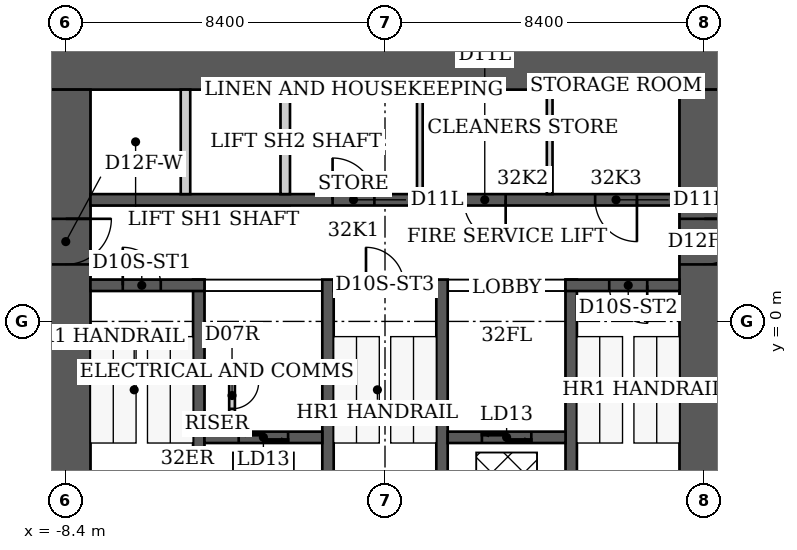
"""IFC4 building model, lengths in metres.
Left out: names, types, materials, properties, quantities, classifications, styles, units other than length and angle.
Written with IfcOpenShell. Run it as: python <this file> out.ifc"""

import sys

from ifc_helpers import new_model, si_unit, direction, frame, frame_2d, origin, place, context, subcontext, project, spatial, rectangle, extrude, element, fill, save


model = new_model("IFC4")
c1 = context("Model", 3, precision=1e-05, world=origin(), true_north=direction((0.0, 1.0)))
c2 = subcontext(c1, "Body", "Model", "MODEL_VIEW")
j1 = project(units=[si_unit("LENGTHUNIT", "METRE"), si_unit("PLANEANGLEUNIT", "RADIAN")], contexts=[c1])
p1 = place(None, origin())
s1 = spatial("IfcSite", under=j1, at=p1, CompositionType="ELEMENT")
p2 = place(p1, origin())
s2 = spatial("IfcBuilding", under=s1, at=p2, CompositionType="ELEMENT")
p3 = place(p2, frame((0.0, 0.0, 131.0)))
s3 = spatial("IfcBuildingStorey", under=s2, at=p3, CompositionType="ELEMENT", Elevation=131.0)
p4 = place(p3, frame((-9.05, 6.75, 0.0), z_axis=(0.0, 0.0, 1.0), x_axis=(1.0, 0.0, 0.0)))
e1 = element("IfcWall", 1, at=p4, inside=s3, PredefinedType="SHEAR", context=c2, shape_type="SweptSolid", body=[
    extrude(rectangle(XDim=18.1, YDim=1.3, at=frame_2d((9.05, 0.0))), origin(), (0.0, 0.0, 1.0), 3.8),
])
p5 = place(p3, frame((-8.4, -9.2, 0.0), z_axis=(0.0, 0.0, 1.0), x_axis=(0.0, 1.0, 0.0)))
e2 = element("IfcWall", 2, at=p5, inside=s3, PredefinedType="SHEAR", context=c2, shape_type="SweptSolid", body=[
    extrude(rectangle(XDim=15.3, YDim=1.3, at=frame_2d((7.65, 0.0))), origin(), (0.0, 0.0, 1.0), 3.8),
])
p6 = place(p5, frame((10.7, 0.0, 0.0)))
e3 = element("IfcOpeningElement", 3, at=p6, cuts=e2, PredefinedType="OPENING", context=c2, shape_type="SweptSolid", body=[
    extrude(rectangle(XDim=1.2, YDim=2.2, at=frame_2d((0.6, 1.1))), frame((0.0, 0.65, 0.0), z_axis=(0.0, -1.0, 0.0), x_axis=(1.0, 0.0, 0.0)), (0.0, 0.0, 1.0), 1.3),
])
p7 = place(p3, frame((8.4, -9.2, 0.0), z_axis=(0.0, 0.0, 1.0), x_axis=(0.0, 1.0, 0.0)))
e4 = element("IfcWall", 4, at=p7, inside=s3, PredefinedType="SHEAR", context=c2, shape_type="SweptSolid", body=[
    extrude(rectangle(XDim=15.3, YDim=1.3, at=frame_2d((7.65, 0.0))), origin(), (0.0, 0.0, 1.0), 3.8),
])
p8 = place(p7, frame((10.7, 0.0, 0.0)))
e5 = element("IfcOpeningElement", 5, at=p8, cuts=e4, PredefinedType="OPENING", context=c2, shape_type="SweptSolid", body=[
    extrude(rectangle(XDim=1.2, YDim=2.2, at=frame_2d((0.6, 1.1))), frame((0.0, 0.65, 0.0), z_axis=(0.0, -1.0, 0.0), x_axis=(1.0, 0.0, 0.0)), (0.0, 0.0, 1.0), 1.3),
])
for number, where, z_axis, x_axis in (
    (6, (-4.9, -6.1, 0.0), (0.0, 0.0, 1.0), (0.0, 1.0, 0.0)),
    (7, (-1.5, -6.1, 0.0), (0.0, 0.0, 1.0), (0.0, 1.0, 0.0)),
    (8, (1.5, -6.1, 0.0), (0.0, 0.0, 1.0), (0.0, 1.0, 0.0)),
    (9, (4.9, -6.1, 0.0), (0.0, 0.0, 1.0), (0.0, 1.0, 0.0)),
):
    element("IfcWall", number, at=place(p3, frame(where, z_axis=z_axis, x_axis=x_axis)), inside=s3, PredefinedType="SHEAR", context=c2, shape_type="SweptSolid", body=[
        extrude(rectangle(XDim=7.2, YDim=0.3, at=frame_2d((3.6, 0.0))), origin(), (0.0, 0.0, 1.0), 3.8),
    ])
p9 = place(p3, frame((-7.75, 0.95, 0.0), z_axis=(0.0, 0.0, 1.0), x_axis=(1.0, 0.0, 0.0)))
e10 = element("IfcWall", 10, at=p9, inside=s3, PredefinedType="SHEAR", context=c2, shape_type="SweptSolid", body=[
    extrude(rectangle(XDim=3.0, YDim=0.3, at=frame_2d((1.5, 0.0))), origin(), (0.0, 0.0, 1.0), 3.8),
])
p10 = place(p9, frame((0.85, 0.0, 0.0)))
e11 = element("IfcOpeningElement", 11, at=p10, cuts=e10, PredefinedType="OPENING", context=c2, shape_type="SweptSolid", body=[
    extrude(rectangle(XDim=1.0, YDim=2.2, at=frame_2d((0.5, 1.1))), frame((0.0, 0.15, 0.0), z_axis=(0.0, -1.0, 0.0), x_axis=(1.0, 0.0, 0.0)), (0.0, 0.0, 1.0), 0.3),
])
p11 = place(p3, frame((-1.35, 0.95, 0.0), z_axis=(0.0, 0.0, 1.0), x_axis=(1.0, 0.0, 0.0)))
e12 = element("IfcWall", 12, at=p11, inside=s3, PredefinedType="SHEAR", context=c2, shape_type="SweptSolid", body=[
    extrude(rectangle(XDim=2.7, YDim=0.3, at=frame_2d((1.35, 0.0))), origin(), (0.0, 0.0, 1.0), 3.8),
])
p12 = place(p11, frame((0.85, 0.0, 0.0)))
e13 = element("IfcOpeningElement", 13, at=p12, cuts=e12, PredefinedType="OPENING", context=c2, shape_type="SweptSolid", body=[
    extrude(rectangle(XDim=1.0, YDim=2.2, at=frame_2d((0.5, 1.1))), frame((0.0, 0.15, 0.0), z_axis=(0.0, -1.0, 0.0), x_axis=(1.0, 0.0, 0.0)), (0.0, 0.0, 1.0), 0.3),
])
p13 = place(p3, frame((4.75, 0.95, 0.0), z_axis=(0.0, 0.0, 1.0), x_axis=(1.0, 0.0, 0.0)))
e14 = element("IfcWall", 14, at=p13, inside=s3, PredefinedType="SHEAR", context=c2, shape_type="SweptSolid", body=[
    extrude(rectangle(XDim=3.0, YDim=0.3, at=frame_2d((1.5, 0.0))), origin(), (0.0, 0.0, 1.0), 3.8),
])
p14 = place(p13, frame((1.15, 0.0, 0.0)))
e15 = element("IfcOpeningElement", 15, at=p14, cuts=e14, PredefinedType="OPENING", context=c2, shape_type="SweptSolid", body=[
    extrude(rectangle(XDim=1.0, YDim=2.2, at=frame_2d((0.5, 1.1))), frame((0.0, 0.15, 0.0), z_axis=(0.0, -1.0, 0.0), x_axis=(1.0, 0.0, 0.0)), (0.0, 0.0, 1.0), 0.3),
])
p15 = place(p3, frame((-4.75, -3.05, 0.0), z_axis=(0.0, 0.0, 1.0), x_axis=(1.0, 0.0, 0.0)))
e16 = element("IfcWall", 16, at=p15, inside=s3, PredefinedType="SHEAR", context=c2, shape_type="SweptSolid", body=[
    extrude(rectangle(XDim=3.1, YDim=0.3, at=frame_2d((1.55, 0.0))), origin(), (0.0, 0.0, 1.0), 3.8),
])
p16 = place(p15, frame((0.9, 0.0, 0.0)))
e17 = element("IfcOpeningElement", 17, at=p16, cuts=e16, PredefinedType="OPENING", context=c2, shape_type="SweptSolid", body=[
    extrude(rectangle(XDim=1.3, YDim=2.1, at=frame_2d((0.65, 1.05))), frame((0.0, 0.15, 0.0), z_axis=(0.0, -1.0, 0.0), x_axis=(1.0, 0.0, 0.0)), (0.0, 0.0, 1.0), 0.3),
])
p17 = place(p3, frame((1.65, -3.05, 0.0), z_axis=(0.0, 0.0, 1.0), x_axis=(1.0, 0.0, 0.0)))
e18 = element("IfcWall", 18, at=p17, inside=s3, PredefinedType="SHEAR", context=c2, shape_type="SweptSolid", body=[
    extrude(rectangle(XDim=3.1, YDim=0.3, at=frame_2d((1.55, 0.0))), origin(), (0.0, 0.0, 1.0), 3.8),
])
p18 = place(p17, frame((0.9, 0.0, 0.0)))
e19 = element("IfcOpeningElement", 19, at=p18, cuts=e18, PredefinedType="OPENING", context=c2, shape_type="SweptSolid", body=[
    extrude(rectangle(XDim=1.3, YDim=2.1, at=frame_2d((0.65, 1.05))), frame((0.0, 0.15, 0.0), z_axis=(0.0, -1.0, 0.0), x_axis=(1.0, 0.0, 0.0)), (0.0, 0.0, 1.0), 0.3),
])
p19 = place(p3, frame((-7.75, 3.2, 0.0), z_axis=(0.0, 0.0, 1.0), x_axis=(1.0, 0.0, 0.0)))
e20 = element("IfcWall", 20, at=p19, inside=s3, PredefinedType="SHEAR", context=c2, shape_type="SweptSolid", body=[
    extrude(rectangle(XDim=15.5, YDim=0.3, at=frame_2d((7.75, 0.0))), origin(), (0.0, 0.0, 1.0), 3.8),
])
p20 = place(p19, frame((6.371, 0.0, 0.0)))
e21 = element("IfcOpeningElement", 21, at=p20, cuts=e20, PredefinedType="OPENING", context=c2, shape_type="SweptSolid", body=[
    extrude(rectangle(XDim=1.1, YDim=2.2, at=frame_2d((0.55, 1.1))), frame((0.0, 0.15, 0.0), z_axis=(0.0, -1.0, 0.0), x_axis=(1.0, 0.0, 0.0)), (0.0, 0.0, 1.0), 0.3),
])
p21 = place(p19, frame((9.825, 0.0, 0.0)))
e22 = element("IfcOpeningElement", 22, at=p21, cuts=e20, PredefinedType="OPENING", context=c2, shape_type="SweptSolid", body=[
    extrude(rectangle(XDim=1.1, YDim=2.2, at=frame_2d((0.55, 1.1))), frame((0.0, 0.15, 0.0), z_axis=(0.0, -1.0, 0.0), x_axis=(1.0, 0.0, 0.0)), (0.0, 0.0, 1.0), 0.3),
])
p22 = place(p19, frame((13.279, 0.0, 0.0)))
e23 = element("IfcOpeningElement", 23, at=p22, cuts=e20, PredefinedType="OPENING", context=c2, shape_type="SweptSolid", body=[
    extrude(rectangle(XDim=1.1, YDim=2.2, at=frame_2d((0.55, 1.1))), frame((0.0, 0.15, 0.0), z_axis=(0.0, -1.0, 0.0), x_axis=(1.0, 0.0, 0.0)), (0.0, 0.0, 1.0), 0.3),
])
for number, where, z_axis, x_axis in (
    (24, (-5.25, 3.35, 0.0), (0.0, 0.0, 1.0), (0.0, 1.0, 0.0)),
    (25, (-2.625, 3.35, 0.0), (0.0, 0.0, 1.0), (0.0, 1.0, 0.0)),
):
    element("IfcWall", number, at=place(p3, frame(where, z_axis=z_axis, x_axis=x_axis)), inside=s3, PredefinedType="PARTITIONING", context=c2, shape_type="SweptSolid", body=[
        extrude(rectangle(XDim=2.75, YDim=0.25, at=frame_2d((1.375, 0.0))), origin(), (0.0, 0.0, 1.0), 3.8),
    ])
p23 = place(p3, frame((-4.025, -2.9, 0.0), z_axis=(0.0, 0.0, 1.0), x_axis=(0.0, 1.0, 0.0)))
e26 = element("IfcWall", 26, at=p23, inside=s3, PredefinedType="PARTITIONING", context=c2, shape_type="SweptSolid", body=[
    extrude(rectangle(XDim=1.775, YDim=0.15, at=frame_2d((0.887, 0.0))), origin(), (0.0, 0.0, 1.0), 3.64),
])
p24 = place(p23, frame((0.6, 0.0, 0.0)))
e27 = element("IfcOpeningElement", 27, at=p24, cuts=e26, PredefinedType="OPENING", context=c2, shape_type="SweptSolid", body=[
    extrude(rectangle(XDim=0.7, YDim=2.1, at=frame_2d((0.35, 1.05))), frame((0.0, 0.075, 0.0), z_axis=(0.0, -1.0, 0.0), x_axis=(1.0, 0.0, 0.0)), (0.0, 0.0, 1.0), 0.15),
])
p25 = place(p3, frame((-4.75, -1.2, 0.0), z_axis=(0.0, 0.0, 1.0), x_axis=(1.0, 0.0, 0.0)))
e28 = element("IfcWall", 28, at=p25, inside=s3, PredefinedType="PARTITIONING", context=c2, shape_type="SweptSolid", body=[
    extrude(rectangle(XDim=0.8, YDim=0.15, at=frame_2d((0.4, 0.0))), origin(), (0.0, 0.0, 1.0), 3.64),
])
for number, where, z_axis, x_axis in (
    (29, (0.917, 3.35, 0.0), (0.0, 0.0, 1.0), (0.0, 1.0, 0.0)),
    (30, (4.333, 3.35, 0.0), (0.0, 0.0, 1.0), (0.0, 1.0, 0.0)),
):
    element("IfcWall", number, at=place(p3, frame(where, z_axis=z_axis, x_axis=x_axis)), inside=s3, PredefinedType="PARTITIONING", context=c2, shape_type="SweptSolid", body=[
        extrude(rectangle(XDim=2.75, YDim=0.15, at=frame_2d((1.375, 0.0))), origin(), (0.0, 0.0, 1.0), 3.64),
    ])
p26 = place(p10, origin())
e31 = element("IfcDoor", 31, at=p26, inside=s3, OperationType="SINGLE_SWING_LEFT", PredefinedType="DOOR", context=c2, shape_type="SweptSolid", body=[
    extrude(rectangle(XDim=1.0, YDim=2.2, at=frame_2d((0.5, 1.1))), frame((0.0, 0.025, 0.0), z_axis=(0.0, -1.0, 0.0), x_axis=(1.0, 0.0, 0.0)), (0.0, 0.0, 1.0), 0.05),
])
fill(e11, e31)
p27 = place(p12, origin())
e32 = element("IfcDoor", 32, at=p27, inside=s3, OperationType="SINGLE_SWING_LEFT", PredefinedType="DOOR", context=c2, shape_type="SweptSolid", body=[
    extrude(rectangle(XDim=1.0, YDim=2.2, at=frame_2d((0.5, 1.1))), frame((0.0, 0.025, 0.0), z_axis=(0.0, -1.0, 0.0), x_axis=(1.0, 0.0, 0.0)), (0.0, 0.0, 1.0), 0.05),
])
fill(e13, e32)
p28 = place(p14, origin())
e33 = element("IfcDoor", 33, at=p28, inside=s3, OperationType="SINGLE_SWING_RIGHT", PredefinedType="DOOR", context=c2, shape_type="SweptSolid", body=[
    extrude(rectangle(XDim=1.0, YDim=2.2, at=frame_2d((0.5, 1.1))), frame((0.0, 0.025, 0.0), z_axis=(0.0, -1.0, 0.0), x_axis=(1.0, 0.0, 0.0)), (0.0, 0.0, 1.0), 0.05),
])
fill(e15, e33)
p29 = place(p6, origin())
e34 = element("IfcDoor", 34, at=p29, inside=s3, OperationType="SINGLE_SWING_RIGHT", PredefinedType="DOOR", context=c2, shape_type="SweptSolid", body=[
    extrude(rectangle(XDim=1.2, YDim=2.2, at=frame_2d((0.6, 1.1))), frame((0.0, 0.025, 0.0), z_axis=(0.0, -1.0, 0.0), x_axis=(1.0, 0.0, 0.0)), (0.0, 0.0, 1.0), 0.05),
])
fill(e3, e34)
p30 = place(p8, origin())
e35 = element("IfcDoor", 35, at=p30, inside=s3, OperationType="SINGLE_SWING_RIGHT", PredefinedType="DOOR", context=c2, shape_type="SweptSolid", body=[
    extrude(rectangle(XDim=1.2, YDim=2.2, at=frame_2d((0.6, 1.1))), frame((0.0, 0.025, 0.0), z_axis=(0.0, -1.0, 0.0), x_axis=(1.0, 0.0, 0.0)), (0.0, 0.0, 1.0), 0.05),
])
fill(e5, e35)
p31 = place(p24, origin())
e36 = element("IfcDoor", 36, at=p31, inside=s3, OperationType="SINGLE_SWING_RIGHT", PredefinedType="DOOR", context=c2, shape_type="SweptSolid", body=[
    extrude(rectangle(XDim=0.7, YDim=2.1, at=frame_2d((0.35, 1.05))), frame((0.0, 0.025, 0.0), z_axis=(0.0, -1.0, 0.0), x_axis=(1.0, 0.0, 0.0)), (0.0, 0.0, 1.0), 0.05),
])
fill(e27, e36)
p32 = place(p20, origin())
e37 = element("IfcDoor", 37, at=p32, inside=s3, OperationType="SINGLE_SWING_LEFT", PredefinedType="DOOR", context=c2, shape_type="SweptSolid", body=[
    extrude(rectangle(XDim=1.1, YDim=2.2, at=frame_2d((0.55, 1.1))), frame((0.0, 0.025, 0.0), z_axis=(0.0, -1.0, 0.0), x_axis=(1.0, 0.0, 0.0)), (0.0, 0.0, 1.0), 0.05),
])
fill(e21, e37)
p33 = place(p21, origin())
e38 = element("IfcDoor", 38, at=p33, inside=s3, OperationType="SINGLE_SWING_RIGHT", PredefinedType="DOOR", context=c2, shape_type="SweptSolid", body=[
    extrude(rectangle(XDim=1.1, YDim=2.2, at=frame_2d((0.55, 1.1))), frame((0.0, 0.025, 0.0), z_axis=(0.0, -1.0, 0.0), x_axis=(1.0, 0.0, 0.0)), (0.0, 0.0, 1.0), 0.05),
])
fill(e22, e38)
p34 = place(p22, origin())
e39 = element("IfcDoor", 39, at=p34, inside=s3, OperationType="SINGLE_SWING_RIGHT", PredefinedType="DOOR", context=c2, shape_type="SweptSolid", body=[
    extrude(rectangle(XDim=1.1, YDim=2.2, at=frame_2d((0.55, 1.1))), frame((0.0, 0.025, 0.0), z_axis=(0.0, -1.0, 0.0), x_axis=(1.0, 0.0, 0.0)), (0.0, 0.0, 1.0), 0.05),
])
fill(e23, e39)
p35 = place(p16, origin())
e40 = element("IfcDoor", 40, at=p35, inside=s3, OperationType="DOUBLE_DOOR_SLIDING", PredefinedType="DOOR", context=c2, shape_type="SweptSolid", body=[
    extrude(rectangle(XDim=1.3, YDim=2.1, at=frame_2d((0.65, 1.05))), frame((0.0, 0.025, 0.0), z_axis=(0.0, -1.0, 0.0), x_axis=(1.0, 0.0, 0.0)), (0.0, 0.0, 1.0), 0.05),
])
fill(e17, e40)
p36 = place(p18, origin())
e41 = element("IfcDoor", 41, at=p36, inside=s3, OperationType="DOUBLE_DOOR_SLIDING", PredefinedType="DOOR", context=c2, shape_type="SweptSolid", body=[
    extrude(rectangle(XDim=1.3, YDim=2.1, at=frame_2d((0.65, 1.05))), frame((0.0, 0.025, 0.0), z_axis=(0.0, -1.0, 0.0), x_axis=(1.0, 0.0, 0.0)), (0.0, 0.0, 1.0), 0.05),
])
fill(e19, e41)
save(model, sys.argv[1])
